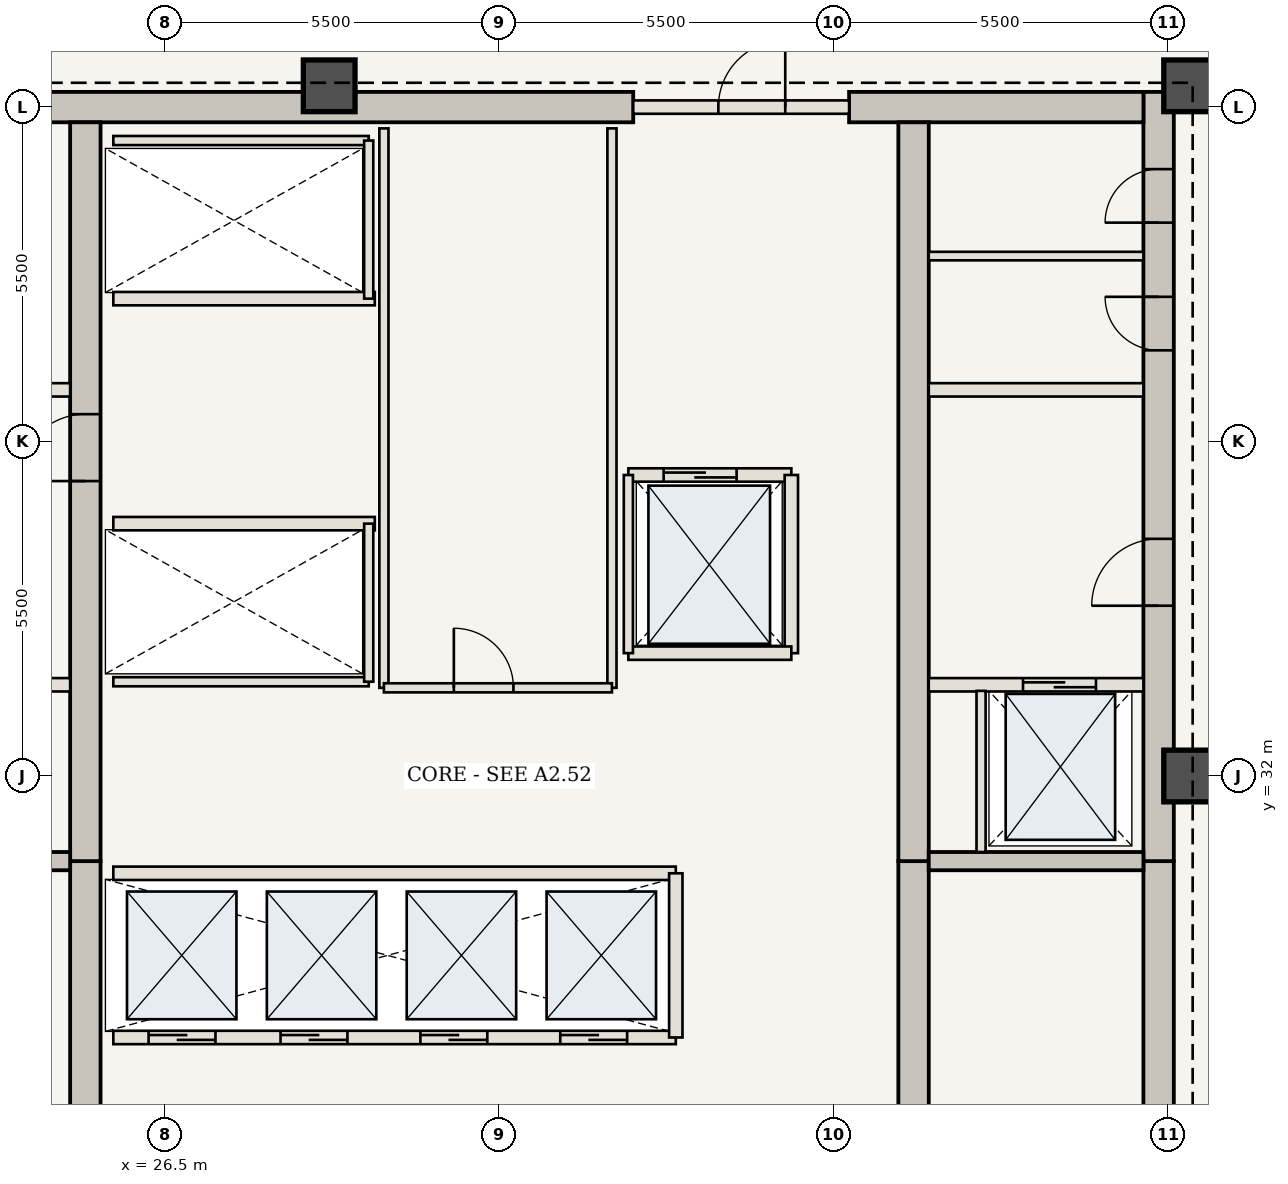
"""IFC4 building model, lengths in metres.
Left out: names, types, materials, properties, quantities, classifications, styles, units other than length and angle.
Written with IfcOpenShell. Run it as: python <this file> out.ifc"""

import sys

from ifc_helpers import new_model, si_unit, direction, frame, frame_2d, origin, origin_2d, place, context, subcontext, project, spatial, rectangle, extrude, element, fill, save


model = new_model("IFC4")
c1 = context("Model", 3, precision=1e-05, world=origin(), true_north=direction((0.0, 1.0)))
c2 = subcontext(c1, "Body", "Model", "MODEL_VIEW")
j1 = project(units=[si_unit("LENGTHUNIT", "METRE"), si_unit("PLANEANGLEUNIT", "RADIAN")], contexts=[c1])
p1 = place(None, origin())
s1 = spatial("IfcSite", under=j1, at=p1, CompositionType="ELEMENT")
p2 = place(p1, origin())
s2 = spatial("IfcBuilding", under=s1, at=p2, CompositionType="ELEMENT")
p3 = place(p2, frame((0.0, 0.0, 236.95)))
s3 = spatial("IfcBuildingStorey", under=s2, at=p3, CompositionType="ELEMENT", Elevation=236.95)
p4 = place(p3, frame((42.84, 20.7, 0.0), z_axis=(0.0, 0.0, 1.0), x_axis=(0.0, 1.0, 0.0)))
e1 = element("IfcWall", 1, at=p4, inside=s3, PredefinedType="SHEAR", context=c2, shape_type="SweptSolid", body=[
    extrude(rectangle(XDim=9.9, YDim=0.5, at=frame_2d((4.95, 0.0))), origin(), (0.0, 0.0, 1.0), 3.85),
])
p5 = place(p4, frame((1.05, 0.0, 0.0)))
e2 = element("IfcOpeningElement", 2, at=p5, cuts=e1, PredefinedType="OPENING", context=c2, shape_type="SweptSolid", body=[
    extrude(rectangle(XDim=1.15, YDim=2.15, at=frame_2d((0.575, 1.075))), frame((0.0, 0.26, 0.0), z_axis=(0.0, -1.0, 0.0), x_axis=(1.0, 0.0, 0.0)), (0.0, 0.0, 1.0), 0.52),
])
p6 = place(p3, frame((42.84, 30.6, 0.0), z_axis=(0.0, 0.0, 1.0), x_axis=(0.0, 1.0, 0.0)))
e3 = element("IfcWall", 3, at=p6, inside=s3, PredefinedType="SHEAR", context=c2, shape_type="SweptSolid", body=[
    extrude(rectangle(XDim=12.65, YDim=0.5, at=frame_2d((6.325, 0.0))), origin(), (0.0, 0.0, 1.0), 3.85),
])
p7 = place(p6, frame((4.2, 0.0, 0.0)))
e4 = element("IfcOpeningElement", 4, at=p7, cuts=e3, PredefinedType="OPENING", context=c2, shape_type="SweptSolid", body=[
    extrude(rectangle(XDim=1.1, YDim=2.15, at=frame_2d((0.55, 1.075))), frame((0.0, 0.26, 0.0), z_axis=(0.0, -1.0, 0.0), x_axis=(1.0, 0.0, 0.0)), (0.0, 0.0, 1.0), 0.52),
])
p8 = place(p6, frame((8.4, 0.0, 0.0)))
e5 = element("IfcOpeningElement", 5, at=p8, cuts=e3, PredefinedType="OPENING", context=c2, shape_type="SweptSolid", body=[
    extrude(rectangle(XDim=0.88, YDim=2.1, at=frame_2d((0.44, 1.05))), frame((0.0, 0.26, 0.0), z_axis=(0.0, -1.0, 0.0), x_axis=(1.0, 0.0, 0.0)), (0.0, 0.0, 1.0), 0.52),
])
p9 = place(p6, frame((10.5, 0.0, 0.0)))
e6 = element("IfcOpeningElement", 6, at=p9, cuts=e3, PredefinedType="OPENING", context=c2, shape_type="SweptSolid", body=[
    extrude(rectangle(XDim=0.88, YDim=2.1, at=frame_2d((0.44, 1.05))), frame((0.0, 0.26, 0.0), z_axis=(0.0, -1.0, 0.0), x_axis=(1.0, 0.0, 0.0)), (0.0, 0.0, 1.0), 0.52),
])
p10 = place(p3, frame((21.41, 43.0, 0.0), z_axis=(0.0, 0.0, 1.0), x_axis=(1.0, 0.0, 0.0)))
e7 = element("IfcWall", 7, at=p10, inside=s3, PredefinedType="SHEAR", context=c2, shape_type="SweptSolid", body=[
    extrude(rectangle(XDim=12.79, YDim=0.5, at=frame_2d((6.395, 0.0))), origin(), (0.0, 0.0, 1.0), 3.85),
])
p11 = place(p3, frame((37.75, 43.0, 0.0), z_axis=(0.0, 0.0, 1.0), x_axis=(1.0, 0.0, 0.0)))
e8 = element("IfcWall", 8, at=p11, inside=s3, PredefinedType="SHEAR", context=c2, shape_type="SweptSolid", body=[
    extrude(rectangle(XDim=4.84, YDim=0.5, at=frame_2d((2.42, 0.0))), origin(), (0.0, 0.0, 1.0), 3.85),
])
p12 = place(p3, frame((25.19, 21.2, 0.0), z_axis=(0.0, 0.0, 1.0), x_axis=(0.0, 1.0, 0.0)))
e9 = element("IfcWall", 9, at=p12, inside=s3, PredefinedType="SHEAR", context=c2, shape_type="SweptSolid", body=[
    extrude(rectangle(XDim=9.4, YDim=0.5, at=frame_2d((4.7, 0.0))), origin(), (0.0, 0.0, 1.0), 3.85),
])
p13 = place(p3, frame((25.19, 30.6, 0.0), z_axis=(0.0, 0.0, 1.0), x_axis=(0.0, 1.0, 0.0)))
e10 = element("IfcWall", 10, at=p13, inside=s3, PredefinedType="SHEAR", context=c2, shape_type="SweptSolid", body=[
    extrude(rectangle(XDim=12.15, YDim=0.5, at=frame_2d((6.075, 0.0))), origin(), (0.0, 0.0, 1.0), 3.85),
])
p14 = place(p13, frame((6.25, 0.0, 0.0)))
e11 = element("IfcOpeningElement", 11, at=p14, cuts=e10, PredefinedType="OPENING", context=c2, shape_type="SweptSolid", body=[
    extrude(rectangle(XDim=1.1, YDim=2.15, at=frame_2d((0.55, 1.075))), frame((0.0, 0.26, 0.0), z_axis=(0.0, -1.0, 0.0), x_axis=(1.0, 0.0, 0.0)), (0.0, 0.0, 1.0), 0.52),
])
p15 = place(p3, frame((38.81, 21.2, 0.0), z_axis=(0.0, 0.0, 1.0), x_axis=(0.0, 1.0, 0.0)))
e12 = element("IfcWall", 12, at=p15, inside=s3, PredefinedType="SHEAR", context=c2, shape_type="SweptSolid", body=[
    extrude(rectangle(XDim=9.4, YDim=0.5, at=frame_2d((4.7, 0.0))), origin(), (0.0, 0.0, 1.0), 3.85),
])
p16 = place(p3, frame((38.81, 30.6, 0.0), z_axis=(0.0, 0.0, 1.0), x_axis=(0.0, 1.0, 0.0)))
e13 = element("IfcWall", 13, at=p16, inside=s3, PredefinedType="SHEAR", context=c2, shape_type="SweptSolid", body=[
    extrude(rectangle(XDim=12.15, YDim=0.5, at=frame_2d((6.075, 0.0))), origin(), (0.0, 0.0, 1.0), 3.85),
])
for number, where, z_axis, x_axis in (
    (14, (43.35, 32.0, 0.0), (0.0, 0.0, 1.0), (1.0, 0.0, 0.0)),
    (15, (43.35, 43.35, 0.0), (0.0, 0.0, 1.0), (1.0, 0.0, 0.0)),
    (16, (29.2, 43.35, 0.0), (0.0, 0.0, 1.0), (1.0, 0.0, 0.0)),
):
    element("IfcColumn", number, at=place(p3, frame(where, z_axis=z_axis, x_axis=x_axis)), inside=s3, PredefinedType="COLUMN", context=c2, shape_type="SweptSolid", body=[
        extrude(rectangle(XDim=0.85, YDim=0.85, at=origin_2d()), origin(), (0.0, 0.0, 1.0), 3.85),
    ])
for number, where, z_axis, x_axis in (
    (17, (21.41, 30.6, 0.0), (0.0, 0.0, 1.0), (1.0, 0.0, 0.0)),
    (18, (39.06, 30.6, 0.0), (0.0, 0.0, 1.0), (1.0, 0.0, 0.0)),
):
    element("IfcWall", number, at=place(p3, frame(where, z_axis=z_axis, x_axis=x_axis)), inside=s3, PredefinedType="SHEAR", context=c2, shape_type="SweptSolid", body=[
        extrude(rectangle(XDim=3.53, YDim=0.3, at=frame_2d((1.765, 0.0))), origin(), (0.0, 0.0, 1.0), 3.685),
    ])
p17 = place(p3, frame((21.41, 33.5, 0.0), z_axis=(0.0, 0.0, 1.0), x_axis=(1.0, 0.0, 0.0)))
e19 = element("IfcWall", 19, at=p17, inside=s3, PredefinedType="STANDARD", context=c2, shape_type="SweptSolid", body=[
    extrude(rectangle(XDim=3.53, YDim=0.22, at=frame_2d((1.765, 0.0))), origin(), (0.0, 0.0, 1.0), 3.685),
])
p18 = place(p17, frame((0.75, 0.0, 0.0)))
e20 = element("IfcOpeningElement", 20, at=p18, cuts=e19, PredefinedType="OPENING", context=c2, shape_type="SweptSolid", body=[
    extrude(rectangle(XDim=1.2, YDim=2.2, at=frame_2d((0.6, 1.1))), frame((0.0, 0.12, 0.0), z_axis=(0.0, -1.0, 0.0), x_axis=(1.0, 0.0, 0.0)), (0.0, 0.0, 1.0), 0.24),
])
p19 = place(p3, frame((39.06, 33.5, 0.0), z_axis=(0.0, 0.0, 1.0), x_axis=(1.0, 0.0, 0.0)))
e21 = element("IfcWall", 21, at=p19, inside=s3, PredefinedType="STANDARD", context=c2, shape_type="SweptSolid", body=[
    extrude(rectangle(XDim=3.53, YDim=0.22, at=frame_2d((1.765, 0.0))), origin(), (0.0, 0.0, 1.0), 3.685),
])
p20 = place(p19, frame((1.55, 0.0, 0.0)))
e22 = element("IfcOpeningElement", 22, at=p20, cuts=e21, PredefinedType="OPENING", context=c2, shape_type="SweptSolid", body=[
    extrude(rectangle(XDim=1.2, YDim=2.2, at=frame_2d((0.6, 1.1))), frame((0.0, 0.12, 0.0), z_axis=(0.0, -1.0, 0.0), x_axis=(1.0, 0.0, 0.0)), (0.0, 0.0, 1.0), 0.24),
])
p21 = place(p3, frame((39.92, 30.75, 0.0), z_axis=(0.0, 0.0, 1.0), x_axis=(0.0, 1.0, 0.0)))
e23 = element("IfcWall", 23, at=p21, inside=s3, PredefinedType="STANDARD", context=c2, shape_type="SweptSolid", body=[
    extrude(rectangle(XDim=2.65, YDim=0.15, at=frame_2d((1.325, 0.0))), origin(), (0.0, 0.0, 1.0), 3.685),
])
for number, where, z_axis, x_axis in (
    (24, (21.41, 38.35, 0.0), (0.0, 0.0, 1.0), (1.0, 0.0, 0.0)),
    (25, (39.06, 38.35, 0.0), (0.0, 0.0, 1.0), (1.0, 0.0, 0.0)),
):
    element("IfcWall", number, at=place(p3, frame(where, z_axis=z_axis, x_axis=x_axis)), inside=s3, PredefinedType="STANDARD", context=c2, shape_type="SweptSolid", body=[
        extrude(rectangle(XDim=3.53, YDim=0.22, at=frame_2d((1.765, 0.0))), origin(), (0.0, 0.0, 1.0), 3.685),
    ])
p22 = place(p3, frame((39.06, 40.55, 0.0), z_axis=(0.0, 0.0, 1.0), x_axis=(1.0, 0.0, 0.0)))
e26 = element("IfcWall", 26, at=p22, inside=s3, PredefinedType="STANDARD", context=c2, shape_type="SweptSolid", body=[
    extrude(rectangle(XDim=3.53, YDim=0.14, at=frame_2d((1.765, 0.0))), origin(), (0.0, 0.0, 1.0), 3.685),
])
p23 = place(p3, frame((25.65, 27.7, 0.0), z_axis=(0.0, 0.0, 1.0), x_axis=(1.0, 0.0, 0.0)))
e27 = element("IfcWall", 27, at=p23, inside=s3, PredefinedType="STANDARD", context=c2, shape_type="SweptSolid", body=[
    extrude(rectangle(XDim=9.25, YDim=0.22, at=frame_2d((4.625, 0.0))), origin(), (0.0, 0.0, 1.0), 3.685),
])
p24 = place(p23, frame((0.58, 0.0, 0.0)))
e28 = element("IfcOpeningElement", 28, at=p24, cuts=e27, PredefinedType="OPENING", context=c2, shape_type="SweptSolid", body=[
    extrude(rectangle(XDim=1.1, YDim=2.15, at=frame_2d((0.55, 1.075))), frame((0.0, 0.12, 0.0), z_axis=(0.0, -1.0, 0.0), x_axis=(1.0, 0.0, 0.0)), (0.0, 0.0, 1.0), 0.24),
])
p25 = place(p23, frame((2.75, 0.0, 0.0)))
e29 = element("IfcOpeningElement", 29, at=p25, cuts=e27, PredefinedType="OPENING", context=c2, shape_type="SweptSolid", body=[
    extrude(rectangle(XDim=1.1, YDim=2.15, at=frame_2d((0.55, 1.075))), frame((0.0, 0.12, 0.0), z_axis=(0.0, -1.0, 0.0), x_axis=(1.0, 0.0, 0.0)), (0.0, 0.0, 1.0), 0.24),
])
p26 = place(p23, frame((5.05, 0.0, 0.0)))
e30 = element("IfcOpeningElement", 30, at=p26, cuts=e27, PredefinedType="OPENING", context=c2, shape_type="SweptSolid", body=[
    extrude(rectangle(XDim=1.1, YDim=2.15, at=frame_2d((0.55, 1.075))), frame((0.0, 0.12, 0.0), z_axis=(0.0, -1.0, 0.0), x_axis=(1.0, 0.0, 0.0)), (0.0, 0.0, 1.0), 0.24),
])
p27 = place(p23, frame((7.35, 0.0, 0.0)))
e31 = element("IfcOpeningElement", 31, at=p27, cuts=e27, PredefinedType="OPENING", context=c2, shape_type="SweptSolid", body=[
    extrude(rectangle(XDim=1.1, YDim=2.15, at=frame_2d((0.55, 1.075))), frame((0.0, 0.12, 0.0), z_axis=(0.0, -1.0, 0.0), x_axis=(1.0, 0.0, 0.0)), (0.0, 0.0, 1.0), 0.24),
])
p28 = place(p3, frame((25.65, 30.4, 0.0), z_axis=(0.0, 0.0, 1.0), x_axis=(1.0, 0.0, 0.0)))
e32 = element("IfcWall", 32, at=p28, inside=s3, PredefinedType="STANDARD", context=c2, shape_type="SweptSolid", body=[
    extrude(rectangle(XDim=9.25, YDim=0.22, at=frame_2d((4.625, 0.0))), origin(), (0.0, 0.0, 1.0), 3.685),
])
p29 = place(p3, frame((34.9, 27.7, 0.0), z_axis=(0.0, 0.0, 1.0), x_axis=(0.0, 1.0, 0.0)))
e33 = element("IfcWall", 33, at=p29, inside=s3, PredefinedType="STANDARD", context=c2, shape_type="SweptSolid", body=[
    extrude(rectangle(XDim=2.7, YDim=0.22, at=frame_2d((1.35, 0.0))), origin(), (0.0, 0.0, 1.0), 3.685),
])
p30 = place(p3, frame((25.65, 36.15, 0.0), z_axis=(0.0, 0.0, 1.0), x_axis=(1.0, 0.0, 0.0)))
e34 = element("IfcWall", 34, at=p30, inside=s3, PredefinedType="STANDARD", context=c2, shape_type="SweptSolid", body=[
    extrude(rectangle(XDim=4.3, YDim=0.22, at=frame_2d((2.15, 0.0))), origin(), (0.0, 0.0, 1.0), 3.685),
])
p31 = place(p3, frame((25.65, 33.55, 0.0), z_axis=(0.0, 0.0, 1.0), x_axis=(1.0, 0.0, 0.0)))
e35 = element("IfcWall", 35, at=p31, inside=s3, PredefinedType="STANDARD", context=c2, shape_type="SweptSolid", body=[
    extrude(rectangle(XDim=4.2, YDim=0.15, at=frame_2d((2.1, 0.0))), origin(), (0.0, 0.0, 1.0), 3.685),
])
p32 = place(p3, frame((29.85, 33.55, 0.0), z_axis=(0.0, 0.0, 1.0), x_axis=(0.0, 1.0, 0.0)))
e36 = element("IfcWall", 36, at=p32, inside=s3, PredefinedType="STANDARD", context=c2, shape_type="SweptSolid", body=[
    extrude(rectangle(XDim=2.6, YDim=0.15, at=frame_2d((1.3, 0.0))), origin(), (0.0, 0.0, 1.0), 3.685),
])
p33 = place(p3, frame((25.65, 39.85, 0.0), z_axis=(0.0, 0.0, 1.0), x_axis=(1.0, 0.0, 0.0)))
e37 = element("IfcWall", 37, at=p33, inside=s3, PredefinedType="STANDARD", context=c2, shape_type="SweptSolid", body=[
    extrude(rectangle(XDim=4.3, YDim=0.22, at=frame_2d((2.15, 0.0))), origin(), (0.0, 0.0, 1.0), 3.685),
])
p34 = place(p3, frame((25.65, 42.45, 0.0), z_axis=(0.0, 0.0, 1.0), x_axis=(1.0, 0.0, 0.0)))
e38 = element("IfcWall", 38, at=p34, inside=s3, PredefinedType="STANDARD", context=c2, shape_type="SweptSolid", body=[
    extrude(rectangle(XDim=4.2, YDim=0.15, at=frame_2d((2.1, 0.0))), origin(), (0.0, 0.0, 1.0), 3.685),
])
p35 = place(p3, frame((29.85, 39.85, 0.0), z_axis=(0.0, 0.0, 1.0), x_axis=(0.0, 1.0, 0.0)))
e39 = element("IfcWall", 39, at=p35, inside=s3, PredefinedType="STANDARD", context=c2, shape_type="SweptSolid", body=[
    extrude(rectangle(XDim=2.6, YDim=0.15, at=frame_2d((1.3, 0.0))), origin(), (0.0, 0.0, 1.0), 3.685),
])
for number, where, z_axis, x_axis in (
    (40, (30.1, 33.45, 0.0), (0.0, 0.0, 1.0), (0.0, 1.0, 0.0)),
    (41, (33.85, 33.45, 0.0), (0.0, 0.0, 1.0), (0.0, 1.0, 0.0)),
):
    element("IfcWall", number, at=place(p3, frame(where, z_axis=z_axis, x_axis=x_axis)), inside=s3, PredefinedType="STANDARD", context=c2, shape_type="SweptSolid", body=[
        extrude(rectangle(XDim=9.2, YDim=0.15, at=frame_2d((4.6, 0.0))), origin(), (0.0, 0.0, 1.0), 3.685),
    ])
p36 = place(p3, frame((30.1, 33.45, 0.0), z_axis=(0.0, 0.0, 1.0), x_axis=(1.0, 0.0, 0.0)))
e42 = element("IfcWall", 42, at=p36, inside=s3, PredefinedType="STANDARD", context=c2, shape_type="SweptSolid", body=[
    extrude(rectangle(XDim=3.75, YDim=0.15, at=frame_2d((1.875, 0.0))), origin(), (0.0, 0.0, 1.0), 3.685),
])
p37 = place(p36, frame((1.15, 0.0, 0.0)))
e43 = element("IfcOpeningElement", 43, at=p37, cuts=e42, PredefinedType="OPENING", context=c2, shape_type="SweptSolid", body=[
    extrude(rectangle(XDim=0.98, YDim=2.2, at=frame_2d((0.49, 1.1))), frame((0.0, 0.085, 0.0), z_axis=(0.0, -1.0, 0.0), x_axis=(1.0, 0.0, 0.0)), (0.0, 0.0, 1.0), 0.17),
])
p38 = place(p3, frame((34.2, 43.0, 0.0), z_axis=(0.0, 0.0, 1.0), x_axis=(1.0, 0.0, 0.0)))
e44 = element("IfcWall", 44, at=p38, inside=s3, PredefinedType="STANDARD", context=c2, shape_type="SweptSolid", body=[
    extrude(rectangle(XDim=3.55, YDim=0.22, at=frame_2d((1.775, 0.0))), origin(), (0.0, 0.0, 1.0), 3.685),
])
p39 = place(p38, frame((1.4, 0.0, 0.0)))
e45 = element("IfcOpeningElement", 45, at=p39, cuts=e44, PredefinedType="OPENING", context=c2, shape_type="SweptSolid", body=[
    extrude(rectangle(XDim=1.1, YDim=2.15, at=frame_2d((0.55, 1.075))), frame((0.0, 0.12, 0.0), z_axis=(0.0, -1.0, 0.0), x_axis=(1.0, 0.0, 0.0)), (0.0, 0.0, 1.0), 0.24),
])
p40 = place(p3, frame((34.12, 36.95, 0.0), z_axis=(0.0, 0.0, 1.0), x_axis=(1.0, 0.0, 0.0)))
e46 = element("IfcWall", 46, at=p40, inside=s3, PredefinedType="STANDARD", context=c2, shape_type="SweptSolid", body=[
    extrude(rectangle(XDim=2.68, YDim=0.22, at=frame_2d((1.34, 0.0))), origin(), (0.0, 0.0, 1.0), 3.685),
])
p41 = place(p40, frame((0.58, 0.0, 0.0)))
e47 = element("IfcOpeningElement", 47, at=p41, cuts=e46, PredefinedType="OPENING", context=c2, shape_type="SweptSolid", body=[
    extrude(rectangle(XDim=1.2, YDim=2.2, at=frame_2d((0.6, 1.1))), frame((0.0, 0.12, 0.0), z_axis=(0.0, -1.0, 0.0), x_axis=(1.0, 0.0, 0.0)), (0.0, 0.0, 1.0), 0.24),
])
p42 = place(p3, frame((36.8, 34.02, 0.0), z_axis=(0.0, 0.0, 1.0), x_axis=(0.0, 1.0, 0.0)))
e48 = element("IfcWall", 48, at=p42, inside=s3, PredefinedType="STANDARD", context=c2, shape_type="SweptSolid", body=[
    extrude(rectangle(XDim=2.93, YDim=0.22, at=frame_2d((1.465, 0.0))), origin(), (0.0, 0.0, 1.0), 3.685),
])
p43 = place(p3, frame((34.12, 34.02, 0.0), z_axis=(0.0, 0.0, 1.0), x_axis=(1.0, 0.0, 0.0)))
e49 = element("IfcWall", 49, at=p43, inside=s3, PredefinedType="STANDARD", context=c2, shape_type="SweptSolid", body=[
    extrude(rectangle(XDim=2.68, YDim=0.22, at=frame_2d((1.34, 0.0))), origin(), (0.0, 0.0, 1.0), 3.685),
])
p44 = place(p3, frame((34.12, 34.02, 0.0), z_axis=(0.0, 0.0, 1.0), x_axis=(0.0, 1.0, 0.0)))
e50 = element("IfcWall", 50, at=p44, inside=s3, PredefinedType="STANDARD", context=c2, shape_type="SweptSolid", body=[
    extrude(rectangle(XDim=2.93, YDim=0.15, at=frame_2d((1.465, 0.0))), origin(), (0.0, 0.0, 1.0), 3.685),
])
p45 = place(p7, origin())
e51 = element("IfcDoor", 51, at=p45, inside=s3, OperationType="SINGLE_SWING_LEFT", PredefinedType="DOOR", context=c2, shape_type="SweptSolid", body=[
    extrude(rectangle(XDim=1.1, YDim=2.15, at=frame_2d((0.55, 1.075))), frame((0.0, 0.025, 0.0), z_axis=(0.0, -1.0, 0.0), x_axis=(1.0, 0.0, 0.0)), (0.0, 0.0, 1.0), 0.05),
])
fill(e4, e51)
p46 = place(p14, origin())
e52 = element("IfcDoor", 52, at=p46, inside=s3, OperationType="SINGLE_SWING_LEFT", PredefinedType="DOOR", context=c2, shape_type="SweptSolid", body=[
    extrude(rectangle(XDim=1.1, YDim=2.15, at=frame_2d((0.55, 1.075))), frame((0.0, 0.025, 0.0), z_axis=(0.0, -1.0, 0.0), x_axis=(1.0, 0.0, 0.0)), (0.0, 0.0, 1.0), 0.05),
])
fill(e11, e52)
p47 = place(p8, origin())
e53 = element("IfcDoor", 53, at=p47, inside=s3, OperationType="SINGLE_SWING_RIGHT", PredefinedType="DOOR", context=c2, shape_type="SweptSolid", body=[
    extrude(rectangle(XDim=0.88, YDim=2.1, at=frame_2d((0.44, 1.05))), frame((0.0, 0.025, 0.0), z_axis=(0.0, -1.0, 0.0), x_axis=(1.0, 0.0, 0.0)), (0.0, 0.0, 1.0), 0.05),
])
fill(e5, e53)
p48 = place(p9, origin())
e54 = element("IfcDoor", 54, at=p48, inside=s3, OperationType="SINGLE_SWING_LEFT", PredefinedType="DOOR", context=c2, shape_type="SweptSolid", body=[
    extrude(rectangle(XDim=0.88, YDim=2.1, at=frame_2d((0.44, 1.05))), frame((0.0, 0.025, 0.0), z_axis=(0.0, -1.0, 0.0), x_axis=(1.0, 0.0, 0.0)), (0.0, 0.0, 1.0), 0.05),
])
fill(e6, e54)
p49 = place(p20, origin())
e55 = element("IfcDoor", 55, at=p49, inside=s3, OperationType="DOUBLE_DOOR_SLIDING", PredefinedType="DOOR", context=c2, shape_type="SweptSolid", body=[
    extrude(rectangle(XDim=1.2, YDim=2.2, at=frame_2d((0.6, 1.1))), frame((0.0, 0.025, 0.0), z_axis=(0.0, -1.0, 0.0), x_axis=(1.0, 0.0, 0.0)), (0.0, 0.0, 1.0), 0.05),
])
fill(e22, e55)
p50 = place(p24, origin())
e56 = element("IfcDoor", 56, at=p50, inside=s3, OperationType="DOUBLE_DOOR_SLIDING", PredefinedType="DOOR", context=c2, shape_type="SweptSolid", body=[
    extrude(rectangle(XDim=1.1, YDim=2.15, at=frame_2d((0.55, 1.075))), frame((0.0, 0.025, 0.0), z_axis=(0.0, -1.0, 0.0), x_axis=(1.0, 0.0, 0.0)), (0.0, 0.0, 1.0), 0.05),
])
fill(e28, e56)
p51 = place(p25, origin())
e57 = element("IfcDoor", 57, at=p51, inside=s3, OperationType="DOUBLE_DOOR_SLIDING", PredefinedType="DOOR", context=c2, shape_type="SweptSolid", body=[
    extrude(rectangle(XDim=1.1, YDim=2.15, at=frame_2d((0.55, 1.075))), frame((0.0, 0.025, 0.0), z_axis=(0.0, -1.0, 0.0), x_axis=(1.0, 0.0, 0.0)), (0.0, 0.0, 1.0), 0.05),
])
fill(e29, e57)
p52 = place(p26, origin())
e58 = element("IfcDoor", 58, at=p52, inside=s3, OperationType="DOUBLE_DOOR_SLIDING", PredefinedType="DOOR", context=c2, shape_type="SweptSolid", body=[
    extrude(rectangle(XDim=1.1, YDim=2.15, at=frame_2d((0.55, 1.075))), frame((0.0, 0.025, 0.0), z_axis=(0.0, -1.0, 0.0), x_axis=(1.0, 0.0, 0.0)), (0.0, 0.0, 1.0), 0.05),
])
fill(e30, e58)
p53 = place(p27, origin())
e59 = element("IfcDoor", 59, at=p53, inside=s3, OperationType="DOUBLE_DOOR_SLIDING", PredefinedType="DOOR", context=c2, shape_type="SweptSolid", body=[
    extrude(rectangle(XDim=1.1, YDim=2.15, at=frame_2d((0.55, 1.075))), frame((0.0, 0.025, 0.0), z_axis=(0.0, -1.0, 0.0), x_axis=(1.0, 0.0, 0.0)), (0.0, 0.0, 1.0), 0.05),
])
fill(e31, e59)
p54 = place(p37, origin())
e60 = element("IfcDoor", 60, at=p54, inside=s3, OperationType="SINGLE_SWING_LEFT", PredefinedType="DOOR", context=c2, shape_type="SweptSolid", body=[
    extrude(rectangle(XDim=0.98, YDim=2.2, at=frame_2d((0.49, 1.1))), frame((0.0, 0.025, 0.0), z_axis=(0.0, -1.0, 0.0), x_axis=(1.0, 0.0, 0.0)), (0.0, 0.0, 1.0), 0.05),
])
fill(e43, e60)
p55 = place(p39, origin())
e61 = element("IfcDoor", 61, at=p55, inside=s3, OperationType="SINGLE_SWING_RIGHT", PredefinedType="DOOR", context=c2, shape_type="SweptSolid", body=[
    extrude(rectangle(XDim=1.1, YDim=2.15, at=frame_2d((0.55, 1.075))), frame((0.0, 0.025, 0.0), z_axis=(0.0, -1.0, 0.0), x_axis=(1.0, 0.0, 0.0)), (0.0, 0.0, 1.0), 0.05),
])
fill(e45, e61)
p56 = place(p41, origin())
e62 = element("IfcDoor", 62, at=p56, inside=s3, OperationType="DOUBLE_DOOR_SLIDING", PredefinedType="DOOR", context=c2, shape_type="SweptSolid", body=[
    extrude(rectangle(XDim=1.2, YDim=2.2, at=frame_2d((0.6, 1.1))), frame((0.0, 0.025, 0.0), z_axis=(0.0, -1.0, 0.0), x_axis=(1.0, 0.0, 0.0)), (0.0, 0.0, 1.0), 0.05),
])
fill(e47, e62)
save(model, sys.argv[1])
